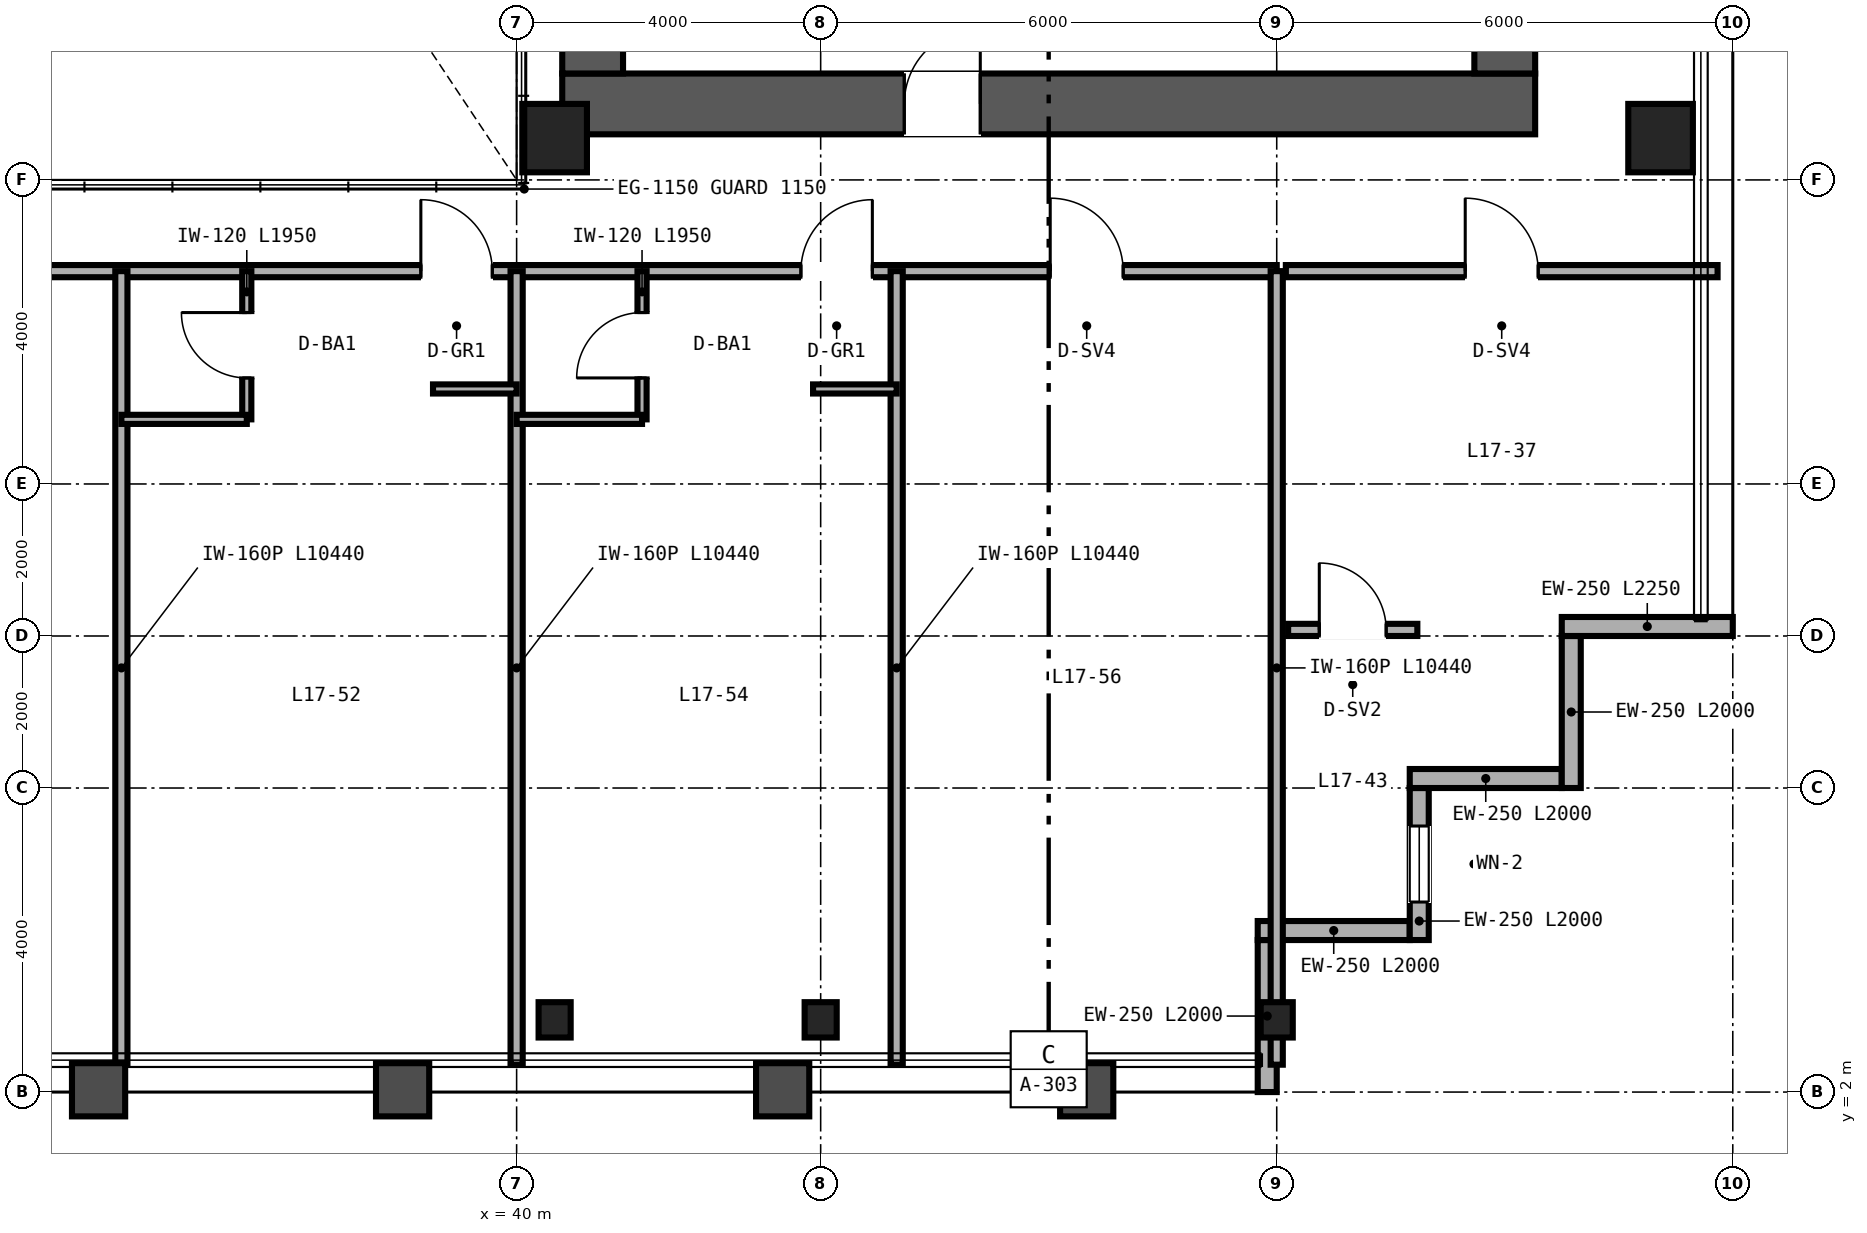
"""IFC4 building model, lengths in metres.
Left out: names, types, materials, properties, quantities, classifications, styles, units other than length and angle.
Written with IfcOpenShell. Run it as: python <this file> out.ifc"""

import sys

from ifc_helpers import new_model, si_unit, direction, frame, frame_2d, origin, origin_2d, place, context, subcontext, project, spatial, rectangle, hollow_rectangle, i_section, extrude, source, transform, mapped, element, fill, save


model = new_model("IFC4")
c1 = context("Model", 3, precision=1e-05, world=origin(), true_north=direction((0.0, 1.0)))
c2 = subcontext(c1, "Body", "Model", "MODEL_VIEW")
j1 = project(units=[si_unit("LENGTHUNIT", "METRE"), si_unit("PLANEANGLEUNIT", "RADIAN")], contexts=[c1])
p1 = place(None, origin())
s1 = spatial("IfcSite", under=j1, at=p1, CompositionType="ELEMENT")
p2 = place(p1, origin())
s2 = spatial("IfcBuilding", under=s1, at=p2, CompositionType="ELEMENT")
p3 = place(p2, frame((0.0, 0.0, 70.8)))
s3 = spatial("IfcBuildingStorey", under=s2, at=p3, CompositionType="ELEMENT", Elevation=70.8)
p4 = place(p3, frame((40.6, 15.0, 0.0), z_axis=(0.0, 0.0, 1.0), x_axis=(1.0, 0.0, 0.0)))
e1 = element("IfcWall", 1, at=p4, inside=s3, PredefinedType="SHEAR", context=c2, shape_type="SweptSolid", body=[
    extrude(rectangle(XDim=12.8, YDim=0.8, at=frame_2d((6.4, 0.0))), origin(), (0.0, 0.0, 1.0), 3.35),
])
p5 = place(p4, frame((4.5, 0.0, 0.0)))
e2 = element("IfcOpeningElement", 2, at=p5, cuts=e1, PredefinedType="OPENING", context=c2, shape_type="SweptSolid", body=[
    extrude(rectangle(XDim=1.0, YDim=2.15, at=frame_2d((0.5, 1.075))), frame((0.0, 0.41, 0.0), z_axis=(0.0, -1.0, 0.0), x_axis=(1.0, 0.0, 0.0)), (0.0, 0.0, 1.0), 0.82),
])
for number, where, z_axis, x_axis in (
    (3, (41.0, 15.4, 0.0), (0.0, 0.0, 1.0), (0.0, 1.0, 0.0)),
    (4, (53.0, 15.4, 0.0), (0.0, 0.0, 1.0), (0.0, 1.0, 0.0)),
):
    element("IfcWall", number, at=place(p3, frame(where, z_axis=z_axis, x_axis=x_axis)), inside=s3, PredefinedType="SHEAR", context=c2, shape_type="SweptSolid", body=[
        extrude(rectangle(XDim=21.2, YDim=0.8, at=frame_2d((10.6, 0.0))), origin(), (0.0, 0.0, 1.0), 3.35),
    ])
m1 = source(origin(), c2, "Body", "SweptSolid", [
    extrude(hollow_rectangle(XDim=0.85, YDim=0.9, WallThickness=0.04, at=origin_2d()), origin(), (0.0, 0.0, 1.0), 3.35),
])
for number, where, z_axis, x_axis in (
    (5, (40.5, 14.55, 0.0), (0.0, 0.0, 1.0), (1.0, 0.0, 0.0)),
    (6, (55.05, 14.55, 0.0), (0.0, 0.0, 1.0), (1.0, 0.0, 0.0)),
):
    element("IfcColumn", number, at=place(p3, frame(where, z_axis=z_axis, x_axis=x_axis)), inside=s3, PredefinedType="COLUMN", context=c2, shape_type="MappedRepresentation", body=[
        mapped(m1, transform((0.0, 0.0, 0.0), scale=1.0)),
    ])
m2 = source(origin(), c2, "Body", "SweptSolid", [
    extrude(i_section(OverallWidth=0.422, OverallDepth=0.465, WebThickness=0.045, FlangeThickness=0.073, FilletRadius=0.025, at=origin_2d()), origin(), (0.0, 0.0, 1.0), 3.35),
])
for number, where, z_axis, x_axis in (
    (7, (40.5, 2.95, 0.0), (0.0, 0.0, 1.0), (1.0, 0.0, 0.0)),
    (8, (44.0, 2.95, 0.0), (0.0, 0.0, 1.0), (1.0, 0.0, 0.0)),
    (9, (50.0, 2.95, 0.0), (0.0, 0.0, 1.0), (1.0, 0.0, 0.0)),
):
    element("IfcColumn", number, at=place(p3, frame(where, z_axis=z_axis, x_axis=x_axis)), inside=s3, PredefinedType="COLUMN", context=c2, shape_type="MappedRepresentation", body=[
        mapped(m2, transform((0.0, 0.0, 0.0), scale=1.0)),
    ])
p6 = place(p3, frame((49.875, 2.0, 0.0), z_axis=(0.0, 0.0, 1.0), x_axis=(0.0, 1.0, 0.0)))
e10 = element("IfcWall", 10, at=p6, inside=s3, PredefinedType="SOLIDWALL", context=c2, shape_type="SweptSolid", body=[
    extrude(rectangle(XDim=2.0, YDim=0.25, at=frame_2d((1.0, 0.0))), origin(), (0.0, 0.0, 1.0), 2.657),
])
p7 = place(p3, frame((49.75, 4.125, 0.0), z_axis=(0.0, 0.0, 1.0), x_axis=(1.0, 0.0, 0.0)))
e11 = element("IfcWall", 11, at=p7, inside=s3, PredefinedType="SOLIDWALL", context=c2, shape_type="SweptSolid", body=[
    extrude(rectangle(XDim=2.0, YDim=0.25, at=frame_2d((1.0, 0.0))), origin(), (0.0, 0.0, 1.0), 3.35),
])
p8 = place(p3, frame((51.875, 4.0, 0.0), z_axis=(0.0, 0.0, 1.0), x_axis=(0.0, 1.0, 0.0)))
e12 = element("IfcWall", 12, at=p8, inside=s3, PredefinedType="SOLIDWALL", context=c2, shape_type="SweptSolid", body=[
    extrude(rectangle(XDim=2.0, YDim=0.25, at=frame_2d((1.0, 0.0))), origin(), (0.0, 0.0, 1.0), 3.35),
])
p9 = place(p8, frame((0.5, 0.0, 0.85)))
e13 = element("IfcOpeningElement", 13, at=p9, cuts=e12, PredefinedType="OPENING", context=c2, shape_type="SweptSolid", body=[
    extrude(rectangle(XDim=1.0, YDim=1.9, at=frame_2d((0.5, 0.95))), frame((0.0, 0.135, 0.0), z_axis=(0.0, -1.0, 0.0), x_axis=(1.0, 0.0, 0.0)), (0.0, 0.0, 1.0), 0.27),
])
for number, where, z_axis, x_axis in (
    (14, (51.75, 6.125, 0.0), (0.0, 0.0, 1.0), (1.0, 0.0, 0.0)),
    (15, (53.875, 6.0, 0.0), (0.0, 0.0, 1.0), (0.0, 1.0, 0.0)),
):
    element("IfcWall", number, at=place(p3, frame(where, z_axis=z_axis, x_axis=x_axis)), inside=s3, PredefinedType="SOLIDWALL", context=c2, shape_type="SweptSolid", body=[
        extrude(rectangle(XDim=2.0, YDim=0.25, at=frame_2d((1.0, 0.0))), origin(), (0.0, 0.0, 1.0), 3.35),
    ])
p10 = place(p3, frame((53.75, 8.125, 0.0), z_axis=(0.0, 0.0, 1.0), x_axis=(1.0, 0.0, 0.0)))
e16 = element("IfcWall", 16, at=p10, inside=s3, PredefinedType="SOLIDWALL", context=c2, shape_type="SweptSolid", body=[
    extrude(rectangle(XDim=2.25, YDim=0.25, at=frame_2d((1.125, 0.0))), origin(), (0.0, 0.0, 1.0), 3.35),
])
p11 = place(p3, frame((50.12, 12.8, 0.0), z_axis=(0.0, 0.0, 1.0), x_axis=(1.0, 0.0, 0.0)))
e17 = element("IfcWall", 17, at=p11, inside=s3, PredefinedType="PARTITIONING", context=c2, shape_type="SweptSolid", body=[
    extrude(rectangle(XDim=5.68, YDim=0.16, at=frame_2d((2.84, 0.0))), origin(), (0.0, 0.0, 1.0), 3.35),
])
p12 = place(p11, frame((2.36, 0.0, 0.0)))
e18 = element("IfcOpeningElement", 18, at=p12, cuts=e17, PredefinedType="OPENING", context=c2, shape_type="SweptSolid", body=[
    extrude(rectangle(XDim=0.96, YDim=2.15, at=frame_2d((0.48, 1.075))), frame((0.0, 0.09, 0.0), z_axis=(0.0, -1.0, 0.0), x_axis=(1.0, 0.0, 0.0)), (0.0, 0.0, 1.0), 0.18),
])
p13 = place(p3, frame((50.15, 8.08, 0.0), z_axis=(0.0, 0.0, 1.0), x_axis=(1.0, 0.0, 0.0)))
e19 = element("IfcWall", 19, at=p13, inside=s3, PredefinedType="PARTITIONING", context=c2, shape_type="SweptSolid", body=[
    extrude(rectangle(XDim=1.7, YDim=0.16, at=frame_2d((0.85, 0.0))), origin(), (0.0, 0.0, 1.0), 3.35),
])
p14 = place(p13, frame((0.41, 0.0, 0.0)))
e20 = element("IfcOpeningElement", 20, at=p14, cuts=e19, PredefinedType="OPENING", context=c2, shape_type="SweptSolid", body=[
    extrude(rectangle(XDim=0.88, YDim=2.15, at=frame_2d((0.44, 1.075))), frame((0.0, 0.09, 0.0), z_axis=(0.0, -1.0, 0.0), x_axis=(1.0, 0.0, 0.0)), (0.0, 0.0, 1.0), 0.18),
])
p15 = place(p3, frame((14.0, 12.8, 0.0), z_axis=(0.0, 0.0, 1.0), x_axis=(1.0, 0.0, 0.0)))
e21 = element("IfcWall", 21, at=p15, inside=s3, PredefinedType="PARTITIONING", context=c2, shape_type="SweptSolid", body=[
    extrude(rectangle(XDim=36.0, YDim=0.16, at=frame_2d((18.0, 0.0))), origin(), (0.0, 0.0, 1.0), 2.571),
])
p16 = place(p15, frame((3.54, 0.0, 0.0)))
e22 = element("IfcOpeningElement", 22, at=p16, cuts=e21, PredefinedType="OPENING", context=c2, shape_type="SweptSolid", body=[
    extrude(rectangle(XDim=0.94, YDim=2.15, at=frame_2d((0.47, 1.075))), frame((0.0, 0.09, 0.0), z_axis=(0.0, -1.0, 0.0), x_axis=(1.0, 0.0, 0.0)), (0.0, 0.0, 1.0), 0.18),
])
p17 = place(p15, frame((7.86, 0.0, 0.0)))
e23 = element("IfcOpeningElement", 23, at=p17, cuts=e21, PredefinedType="OPENING", context=c2, shape_type="SweptSolid", body=[
    extrude(rectangle(XDim=0.94, YDim=2.15, at=frame_2d((0.47, 1.075))), frame((0.0, 0.09, 0.0), z_axis=(0.0, -1.0, 0.0), x_axis=(1.0, 0.0, 0.0)), (0.0, 0.0, 1.0), 0.18),
])
p18 = place(p15, frame((11.92, 0.0, 0.0)))
e24 = element("IfcOpeningElement", 24, at=p18, cuts=e21, PredefinedType="OPENING", context=c2, shape_type="SweptSolid", body=[
    extrude(rectangle(XDim=0.96, YDim=2.15, at=frame_2d((0.48, 1.075))), frame((0.0, 0.09, 0.0), z_axis=(0.0, -1.0, 0.0), x_axis=(1.0, 0.0, 0.0)), (0.0, 0.0, 1.0), 0.18),
])
p19 = place(p15, frame((17.52, 0.0, 0.0)))
e25 = element("IfcOpeningElement", 25, at=p19, cuts=e21, PredefinedType="OPENING", context=c2, shape_type="SweptSolid", body=[
    extrude(rectangle(XDim=0.96, YDim=2.15, at=frame_2d((0.48, 1.075))), frame((0.0, 0.09, 0.0), z_axis=(0.0, -1.0, 0.0), x_axis=(1.0, 0.0, 0.0)), (0.0, 0.0, 1.0), 0.18),
])
p20 = place(p15, frame((24.74, 0.0, 0.0)))
e26 = element("IfcOpeningElement", 26, at=p20, cuts=e21, PredefinedType="OPENING", context=c2, shape_type="SweptSolid", body=[
    extrude(rectangle(XDim=0.94, YDim=2.15, at=frame_2d((0.47, 1.075))), frame((0.0, 0.09, 0.0), z_axis=(0.0, -1.0, 0.0), x_axis=(1.0, 0.0, 0.0)), (0.0, 0.0, 1.0), 0.18),
])
p21 = place(p15, frame((29.74, 0.0, 0.0)))
e27 = element("IfcOpeningElement", 27, at=p21, cuts=e21, PredefinedType="OPENING", context=c2, shape_type="SweptSolid", body=[
    extrude(rectangle(XDim=0.94, YDim=2.15, at=frame_2d((0.47, 1.075))), frame((0.0, 0.09, 0.0), z_axis=(0.0, -1.0, 0.0), x_axis=(1.0, 0.0, 0.0)), (0.0, 0.0, 1.0), 0.18),
])
p22 = place(p15, frame((33.02, 0.0, 0.0)))
e28 = element("IfcOpeningElement", 28, at=p22, cuts=e21, PredefinedType="OPENING", context=c2, shape_type="SweptSolid", body=[
    extrude(rectangle(XDim=0.96, YDim=2.15, at=frame_2d((0.48, 1.075))), frame((0.0, 0.09, 0.0), z_axis=(0.0, -1.0, 0.0), x_axis=(1.0, 0.0, 0.0)), (0.0, 0.0, 1.0), 0.18),
])
p23 = place(p3, frame((50.0, 2.36, 0.0), z_axis=(0.0, 0.0, 1.0), x_axis=(0.0, 1.0, 0.0)))
e29 = element("IfcWall", 29, at=p23, inside=s3, PredefinedType="PARTITIONING", context=c2, shape_type="SweptSolid", body=[
    extrude(rectangle(XDim=10.44, YDim=0.16, at=frame_2d((5.22, 0.0))), origin(), (0.0, 0.0, 1.0), 2.657),
])
for number, where, z_axis, x_axis in (
    (30, (34.8, 2.36, 0.0), (0.0, 0.0, 1.0), (0.0, 1.0, 0.0)),
    (31, (40.0, 2.36, 0.0), (0.0, 0.0, 1.0), (0.0, 1.0, 0.0)),
):
    element("IfcWall", number, at=place(p3, frame(where, z_axis=z_axis, x_axis=x_axis)), inside=s3, PredefinedType="PARTITIONING", context=c2, shape_type="SweptSolid", body=[
        extrude(rectangle(XDim=10.44, YDim=0.16, at=frame_2d((5.22, 0.0))), origin(), (0.0, 0.0, 1.0), 2.423),
    ])
p24 = place(p3, frame((36.45, 10.85, 0.0), z_axis=(0.0, 0.0, 1.0), x_axis=(0.0, 1.0, 0.0)))
e32 = element("IfcWall", 32, at=p24, inside=s3, PredefinedType="PARTITIONING", context=c2, shape_type="SweptSolid", body=[
    extrude(rectangle(XDim=1.95, YDim=0.12, at=frame_2d((0.975, 0.0))), origin(), (0.0, 0.0, 1.0), 3.35),
])
p25 = place(p24, frame((0.545, 0.0, 0.0)))
e33 = element("IfcOpeningElement", 33, at=p25, cuts=e32, PredefinedType="OPENING", context=c2, shape_type="SweptSolid", body=[
    extrude(rectangle(XDim=0.86, YDim=2.1, at=frame_2d((0.43, 1.05))), frame((0.0, 0.07, 0.0), z_axis=(0.0, -1.0, 0.0), x_axis=(1.0, 0.0, 0.0)), (0.0, 0.0, 1.0), 0.14),
])
p26 = place(p3, frame((34.8, 10.85, 0.0), z_axis=(0.0, 0.0, 1.0), x_axis=(1.0, 0.0, 0.0)))
e34 = element("IfcWall", 34, at=p26, inside=s3, PredefinedType="PARTITIONING", context=c2, shape_type="SweptSolid", body=[
    extrude(rectangle(XDim=1.65, YDim=0.12, at=frame_2d((0.825, 0.0))), origin(), (0.0, 0.0, 1.0), 3.35),
])
p27 = place(p3, frame((38.9, 11.25, 0.0), z_axis=(0.0, 0.0, 1.0), x_axis=(1.0, 0.0, 0.0)))
e35 = element("IfcWall", 35, at=p27, inside=s3, PredefinedType="PARTITIONING", context=c2, shape_type="SweptSolid", body=[
    extrude(rectangle(XDim=1.1, YDim=0.12, at=frame_2d((0.55, 0.0))), origin(), (0.0, 0.0, 1.0), 3.35),
])
p28 = place(p3, frame((45.0, 2.36, 0.0), z_axis=(0.0, 0.0, 1.0), x_axis=(0.0, 1.0, 0.0)))
e36 = element("IfcWall", 36, at=p28, inside=s3, PredefinedType="PARTITIONING", context=c2, shape_type="SweptSolid", body=[
    extrude(rectangle(XDim=10.44, YDim=0.16, at=frame_2d((5.22, 0.0))), origin(), (0.0, 0.0, 1.0), 2.657),
])
p29 = place(p3, frame((41.65, 10.85, 0.0), z_axis=(0.0, 0.0, 1.0), x_axis=(0.0, 1.0, 0.0)))
e37 = element("IfcWall", 37, at=p29, inside=s3, PredefinedType="PARTITIONING", context=c2, shape_type="SweptSolid", body=[
    extrude(rectangle(XDim=1.95, YDim=0.12, at=frame_2d((0.975, 0.0))), origin(), (0.0, 0.0, 1.0), 3.35),
])
p30 = place(p29, frame((0.545, 0.0, 0.0)))
e38 = element("IfcOpeningElement", 38, at=p30, cuts=e37, PredefinedType="OPENING", context=c2, shape_type="SweptSolid", body=[
    extrude(rectangle(XDim=0.86, YDim=2.1, at=frame_2d((0.43, 1.05))), frame((0.0, 0.07, 0.0), z_axis=(0.0, -1.0, 0.0), x_axis=(1.0, 0.0, 0.0)), (0.0, 0.0, 1.0), 0.14),
])
p31 = place(p3, frame((40.0, 10.85, 0.0), z_axis=(0.0, 0.0, 1.0), x_axis=(1.0, 0.0, 0.0)))
e39 = element("IfcWall", 39, at=p31, inside=s3, PredefinedType="PARTITIONING", context=c2, shape_type="SweptSolid", body=[
    extrude(rectangle(XDim=1.65, YDim=0.12, at=frame_2d((0.825, 0.0))), origin(), (0.0, 0.0, 1.0), 2.571),
])
p32 = place(p3, frame((43.9, 11.25, 0.0), z_axis=(0.0, 0.0, 1.0), x_axis=(1.0, 0.0, 0.0)))
e40 = element("IfcWall", 40, at=p32, inside=s3, PredefinedType="PARTITIONING", context=c2, shape_type="SweptSolid", body=[
    extrude(rectangle(XDim=1.1, YDim=0.12, at=frame_2d((0.55, 0.0))), origin(), (0.0, 0.0, 1.0), 3.35),
])
m3 = source(origin(), c2, "Body", "SweptSolid", [
    extrude(rectangle(XDim=1.0, YDim=1.9, at=frame_2d((0.5, 0.95))), frame((0.0, 0.03, 0.0), z_axis=(0.0, -1.0, 0.0), x_axis=(1.0, 0.0, 0.0)), (0.0, 0.0, 1.0), 0.06),
])
p33 = place(p9, origin())
e41 = element("IfcWindow", 41, at=p33, inside=s3, PartitioningType="SINGLE_PANEL", PredefinedType="WINDOW", context=c2, shape_type="MappedRepresentation", body=[
    mapped(m3, transform((0.0, 0.0, 0.0), scale=1.0)),
])
fill(e13, e41)
m4 = source(origin(), c2, "Body", "SweptSolid", [
    extrude(rectangle(XDim=1.0, YDim=2.15, at=frame_2d((0.5, 1.075))), frame((0.0, 0.025, 0.0), z_axis=(0.0, -1.0, 0.0), x_axis=(1.0, 0.0, 0.0)), (0.0, 0.0, 1.0), 0.05),
])
p34 = place(p5, origin())
e42 = element("IfcDoor", 42, at=p34, inside=s3, OperationType="SINGLE_SWING_RIGHT", PredefinedType="DOOR", context=c2, shape_type="MappedRepresentation", body=[
    mapped(m4, transform((0.0, 0.0, 0.0), scale=1.0)),
])
fill(e2, e42)
m5 = source(origin(), c2, "Body", "SweptSolid", [
    extrude(rectangle(XDim=0.96, YDim=2.15, at=frame_2d((0.48, 1.075))), frame((0.0, 0.025, 0.0), z_axis=(0.0, -1.0, 0.0), x_axis=(1.0, 0.0, 0.0)), (0.0, 0.0, 1.0), 0.05),
])
p35 = place(p12, origin())
e43 = element("IfcDoor", 43, at=p35, inside=s3, OperationType="SINGLE_SWING_LEFT", PredefinedType="DOOR", context=c2, shape_type="MappedRepresentation", body=[
    mapped(m5, transform((0.0, 0.0, 0.0), scale=1.0)),
])
fill(e18, e43)
m6 = source(origin(), c2, "Body", "SweptSolid", [
    extrude(rectangle(XDim=0.88, YDim=2.15, at=frame_2d((0.44, 1.075))), frame((0.0, 0.025, 0.0), z_axis=(0.0, -1.0, 0.0), x_axis=(1.0, 0.0, 0.0)), (0.0, 0.0, 1.0), 0.05),
])
p36 = place(p14, origin())
e44 = element("IfcDoor", 44, at=p36, inside=s3, OperationType="SINGLE_SWING_LEFT", PredefinedType="DOOR", context=c2, shape_type="MappedRepresentation", body=[
    mapped(m6, transform((0.0, 0.0, 0.0), scale=1.0)),
])
fill(e20, e44)
m7 = source(origin(), c2, "Body", "SweptSolid", [
    extrude(rectangle(XDim=0.86, YDim=2.1, at=frame_2d((0.43, 1.05))), frame((0.0, 0.025, 0.0), z_axis=(0.0, -1.0, 0.0), x_axis=(1.0, 0.0, 0.0)), (0.0, 0.0, 1.0), 0.05),
])
p37 = place(p25, origin())
e45 = element("IfcDoor", 45, at=p37, inside=s3, OperationType="SINGLE_SWING_RIGHT", PredefinedType="DOOR", context=c2, shape_type="MappedRepresentation", body=[
    mapped(m7, transform((0.0, 0.0, 0.0), scale=1.0)),
])
fill(e33, e45)
p38 = place(p30, origin())
e46 = element("IfcDoor", 46, at=p38, inside=s3, OperationType="SINGLE_SWING_LEFT", PredefinedType="DOOR", context=c2, shape_type="MappedRepresentation", body=[
    mapped(m7, transform((0.0, 0.0, 0.0), scale=1.0)),
])
fill(e38, e46)
m8 = source(origin(), c2, "Body", "SweptSolid", [
    extrude(rectangle(XDim=0.94, YDim=2.15, at=frame_2d((0.47, 1.075))), frame((0.0, 0.025, 0.0), z_axis=(0.0, -1.0, 0.0), x_axis=(1.0, 0.0, 0.0)), (0.0, 0.0, 1.0), 0.05),
])
p39 = place(p20, origin())
e47 = element("IfcDoor", 47, at=p39, inside=s3, OperationType="SINGLE_SWING_LEFT", PredefinedType="DOOR", context=c2, shape_type="MappedRepresentation", body=[
    mapped(m8, transform((0.0, 0.0, 0.0), scale=1.0)),
])
fill(e26, e47)
p40 = place(p21, origin())
e48 = element("IfcDoor", 48, at=p40, inside=s3, OperationType="SINGLE_SWING_RIGHT", PredefinedType="DOOR", context=c2, shape_type="MappedRepresentation", body=[
    mapped(m8, transform((0.0, 0.0, 0.0), scale=1.0)),
])
fill(e27, e48)
p41 = place(p22, origin())
e49 = element("IfcDoor", 49, at=p41, inside=s3, OperationType="SINGLE_SWING_LEFT", PredefinedType="DOOR", context=c2, shape_type="MappedRepresentation", body=[
    mapped(m5, transform((0.0, 0.0, 0.0), scale=1.0)),
])
fill(e28, e49)
save(model, sys.argv[1])
